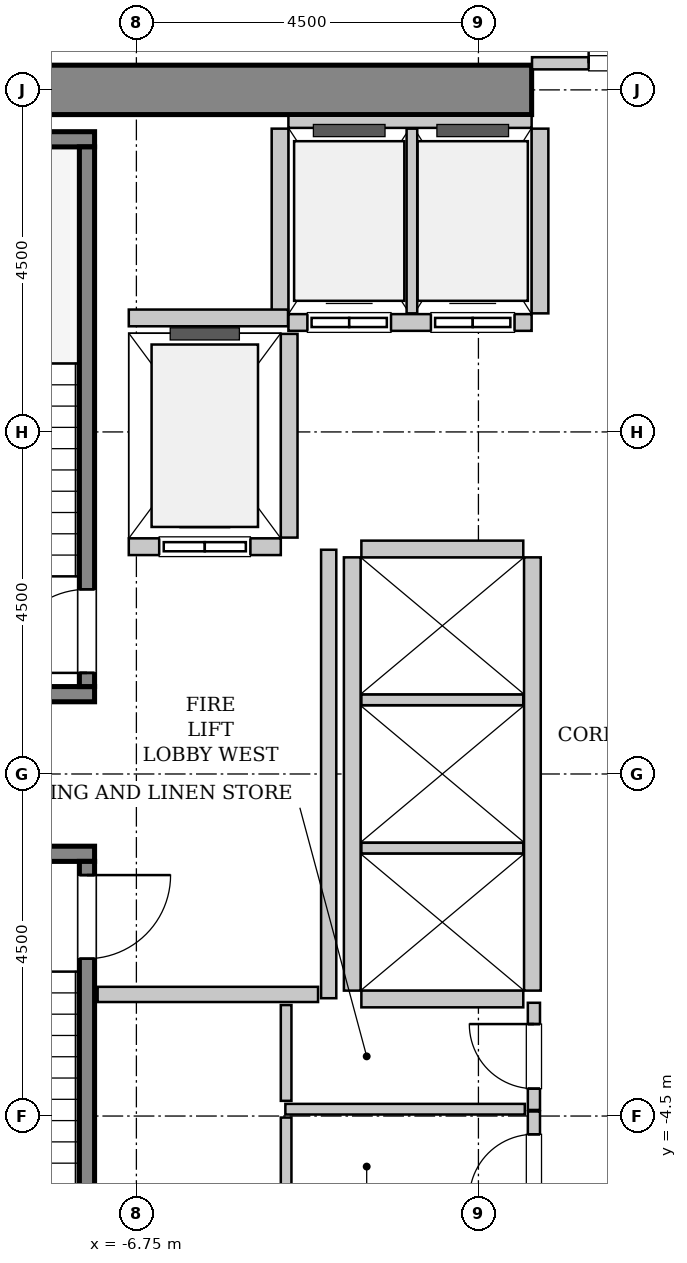
"""IFC4 building model, lengths in metres.
Left out: names, types, materials, properties, quantities, classifications, styles, units other than length and angle.
Written with IfcOpenShell. Run it as: python <this file> out.ifc"""

import sys

from ifc_helpers import new_model, si_unit, direction, frame, frame_2d, origin, place, context, subcontext, project, spatial, rectangle, extrude, source, transform, mapped, element, fill, save


model = new_model("IFC4")
c1 = context("Model", 3, precision=1e-05, world=origin(), true_north=direction((0.0, 1.0)))
c2 = subcontext(c1, "Body", "Model", "MODEL_VIEW")
j1 = project(units=[si_unit("LENGTHUNIT", "METRE"), si_unit("PLANEANGLEUNIT", "RADIAN")], contexts=[c1])
p1 = place(None, origin())
s1 = spatial("IfcSite", under=j1, at=p1, CompositionType="ELEMENT")
p2 = place(p1, origin())
s2 = spatial("IfcBuilding", under=s1, at=p2, CompositionType="ELEMENT")
p3 = place(p2, frame((0.0, 0.0, 59.6)))
s3 = spatial("IfcBuildingStorey", under=s2, at=p3, CompositionType="ELEMENT", Elevation=59.6)
m1 = source(origin(), c2, "Body", "SweptSolid", [
    extrude(rectangle(XDim=10.025, YDim=0.65, at=frame_2d((5.012, 0.0))), origin(), (0.0, 0.0, 1.0), 3.8),
])
p4 = place(p3, frame((-11.575, 9.0, 0.0), z_axis=(0.0, 0.0, 1.0), x_axis=(1.0, 0.0, 0.0)))
e1 = element("IfcWall", 1, at=p4, inside=s3, PredefinedType="SHEAR", context=c2, shape_type="MappedRepresentation", body=[
    mapped(m1, transform((0.0, 0.0, 0.0), x_axis=(1.0, 0.0, 0.0), y_axis=(0.0, 1.0, 0.0), z_axis=(0.0, 0.0, 1.0), scale=1.0)),
])
m2 = source(origin(), c2, "Body", "SweptSolid", [
    extrude(rectangle(XDim=3.4, YDim=0.2, at=frame_2d((1.7, 0.0))), origin(), (0.0, 0.0, 1.0), 3.8),
])
p5 = place(p3, frame((-7.3, 1.05, 0.0), z_axis=(0.0, 0.0, 1.0), x_axis=(-1.0, 0.0, 0.0)))
e2 = element("IfcWall", 2, at=p5, inside=s3, PredefinedType="SOLIDWALL", context=c2, shape_type="MappedRepresentation", body=[
    mapped(m2, transform((0.0, 0.0, 0.0), x_axis=(1.0, 0.0, 0.0), y_axis=(0.0, 1.0, 0.0), z_axis=(0.0, 0.0, 1.0), scale=1.0)),
])
m3 = source(origin(), c2, "Body", "SweptSolid", [
    extrude(rectangle(XDim=3.63, YDim=0.2, at=frame_2d((1.815, 0.0))), origin(), (0.0, 0.0, 1.0), 3.8),
])
p6 = place(p3, frame((-7.3, 8.35, 0.0), z_axis=(0.0, 0.0, 1.0), x_axis=(-1.0, 0.0, 0.0)))
e3 = element("IfcWall", 3, at=p6, inside=s3, PredefinedType="SOLIDWALL", context=c2, shape_type="MappedRepresentation", body=[
    mapped(m3, transform((0.0, 0.0, 0.0), x_axis=(1.0, 0.0, 0.0), y_axis=(0.0, 1.0, 0.0), z_axis=(0.0, 0.0, 1.0), scale=1.0)),
])
m4 = source(origin(), c2, "Body", "SweptSolid", [
    extrude(rectangle(XDim=7.1, YDim=0.2, at=frame_2d((3.55, 0.0))), origin(), (0.0, 0.0, 1.0), 3.8),
])
p7 = place(p3, frame((-7.4, 1.15, 0.0), z_axis=(0.0, 0.0, 1.0), x_axis=(0.0, 1.0, 0.0)))
e4 = element("IfcWall", 4, at=p7, inside=s3, PredefinedType="SOLIDWALL", context=c2, shape_type="MappedRepresentation", body=[
    mapped(m4, transform((0.0, 0.0, 0.0), x_axis=(1.0, 0.0, 0.0), y_axis=(0.0, 1.0, 0.0), z_axis=(0.0, 0.0, 1.0), scale=1.0)),
])
p8 = place(p7, frame((0.18, 0.0, 0.0)))
e5 = element("IfcOpeningElement", 5, at=p8, cuts=e4, PredefinedType="OPENING", context=c2, shape_type="SweptSolid", body=[
    extrude(rectangle(XDim=1.1, YDim=2.15, at=frame_2d((0.55, 1.075))), frame((0.0, 0.11, 0.0), z_axis=(0.0, -1.0, 0.0), x_axis=(1.0, 0.0, 0.0)), (0.0, 0.0, 1.0), 0.22),
])
p9 = place(p3, frame((-10.7, -1.05, 0.0), z_axis=(0.0, 0.0, 1.0), x_axis=(1.0, 0.0, 0.0)))
e6 = element("IfcWall", 6, at=p9, inside=s3, PredefinedType="SOLIDWALL", context=c2, shape_type="MappedRepresentation", body=[
    mapped(m2, transform((0.0, 0.0, 0.0), x_axis=(1.0, 0.0, 0.0), y_axis=(0.0, 1.0, 0.0), z_axis=(0.0, 0.0, 1.0), scale=1.0)),
])
p10 = place(p3, frame((-7.4, -1.15, 0.0), z_axis=(0.0, 0.0, 1.0), x_axis=(0.0, -1.0, 0.0)))
e7 = element("IfcWall", 7, at=p10, inside=s3, PredefinedType="SOLIDWALL", context=c2, shape_type="MappedRepresentation", body=[
    mapped(m4, transform((0.0, 0.0, 0.0), x_axis=(1.0, 0.0, 0.0), y_axis=(0.0, 1.0, 0.0), z_axis=(0.0, 0.0, 1.0), scale=1.0)),
])
p11 = place(p10, frame((0.18, 0.0, 0.0)))
e8 = element("IfcOpeningElement", 8, at=p11, cuts=e7, PredefinedType="OPENING", context=c2, shape_type="SweptSolid", body=[
    extrude(rectangle(XDim=1.1, YDim=2.15, at=frame_2d((0.55, 1.075))), frame((0.0, 0.11, 0.0), z_axis=(0.0, -1.0, 0.0), x_axis=(1.0, 0.0, 0.0)), (0.0, 0.0, 1.0), 0.22),
])
m5 = source(origin(), c2, "Body", "SweptSolid", [
    extrude(rectangle(XDim=2.0, YDim=0.22, at=frame_2d((1.0, 0.0))), origin(), (0.0, 0.0, 1.0), 3.535),
])
p12 = place(p3, frame((-6.85, 2.99, 0.0), z_axis=(0.0, 0.0, 1.0), x_axis=(1.0, 0.0, 0.0)))
e9 = element("IfcWall", 9, at=p12, inside=s3, PredefinedType="SOLIDWALL", context=c2, shape_type="MappedRepresentation", body=[
    mapped(m5, transform((0.0, 0.0, 0.0), x_axis=(1.0, 0.0, 0.0), y_axis=(0.0, 1.0, 0.0), z_axis=(0.0, 0.0, 1.0), scale=1.0)),
])
p13 = place(p12, frame((0.4, 0.0, 0.0)))
e10 = element("IfcOpeningElement", 10, at=p13, cuts=e9, PredefinedType="OPENING", context=c2, shape_type="SweptSolid", body=[
    extrude(rectangle(XDim=1.2, YDim=2.2, at=frame_2d((0.6, 1.1))), frame((0.0, 0.12, 0.0), z_axis=(0.0, -1.0, 0.0), x_axis=(1.0, 0.0, 0.0)), (0.0, 0.0, 1.0), 0.24),
])
m6 = source(origin(), c2, "Body", "SweptSolid", [
    extrude(rectangle(XDim=2.68, YDim=0.22, at=frame_2d((1.34, 0.0))), origin(), (0.0, 0.0, 1.0), 3.535),
])
p14 = place(p3, frame((-4.74, 3.11, 0.0), z_axis=(0.0, 0.0, 1.0), x_axis=(0.0, 1.0, 0.0)))
e11 = element("IfcWall", 11, at=p14, inside=s3, PredefinedType="SOLIDWALL", context=c2, shape_type="MappedRepresentation", body=[
    mapped(m6, transform((0.0, 0.0, 0.0), x_axis=(1.0, 0.0, 0.0), y_axis=(0.0, 1.0, 0.0), z_axis=(0.0, 0.0, 1.0), scale=1.0)),
])
m7 = source(origin(), c2, "Body", "SweptSolid", [
    extrude(rectangle(XDim=3.2, YDim=0.22, at=frame_2d((1.6, 0.0))), origin(), (0.0, 0.0, 1.0), 3.535),
])
p15 = place(p3, frame((-4.75, 5.94, 0.0), z_axis=(0.0, 0.0, 1.0), x_axis=(1.0, 0.0, 0.0)))
e12 = element("IfcWall", 12, at=p15, inside=s3, PredefinedType="SOLIDWALL", context=c2, shape_type="MappedRepresentation", body=[
    mapped(m7, transform((0.0, 0.0, 0.0), x_axis=(1.0, 0.0, 0.0), y_axis=(0.0, 1.0, 0.0), z_axis=(0.0, 0.0, 1.0), scale=1.0)),
])
p16 = place(p15, frame((0.25, 0.0, 0.0)))
e13 = element("IfcOpeningElement", 13, at=p16, cuts=e12, PredefinedType="OPENING", context=c2, shape_type="SweptSolid", body=[
    extrude(rectangle(XDim=1.1, YDim=2.2, at=frame_2d((0.55, 1.1))), frame((0.0, 0.12, 0.0), z_axis=(0.0, -1.0, 0.0), x_axis=(1.0, 0.0, 0.0)), (0.0, 0.0, 1.0), 0.24),
])
p17 = place(p15, frame((1.875, 0.0, 0.0)))
e14 = element("IfcOpeningElement", 14, at=p17, cuts=e12, PredefinedType="OPENING", context=c2, shape_type="SweptSolid", body=[
    extrude(rectangle(XDim=1.1, YDim=2.2, at=frame_2d((0.55, 1.1))), frame((0.0, 0.12, 0.0), z_axis=(0.0, -1.0, 0.0), x_axis=(1.0, 0.0, 0.0)), (0.0, 0.0, 1.0), 0.24),
])
m8 = source(origin(), c2, "Body", "SweptSolid", [
    extrude(rectangle(XDim=3.2, YDim=0.16, at=frame_2d((1.6, 0.0))), origin(), (0.0, 0.0, 1.0), 2.425),
])
p18 = place(p3, frame((-1.55, 8.58, 0.0), z_axis=(0.0, 0.0, 1.0), x_axis=(-1.0, 0.0, 0.0)))
e15 = element("IfcWall", 15, at=p18, inside=s3, PredefinedType="PARTITIONING", context=c2, shape_type="MappedRepresentation", body=[
    mapped(m8, transform((0.0, 0.0, 0.0), x_axis=(1.0, 0.0, 0.0), y_axis=(0.0, 1.0, 0.0), z_axis=(0.0, 0.0, 1.0), scale=1.0)),
])
m9 = source(origin(), c2, "Body", "SweptSolid", [
    extrude(rectangle(XDim=2.43, YDim=0.22, at=frame_2d((1.215, 0.0))), origin(), (0.0, 0.0, 1.0), 3.535),
])
p19 = place(p3, frame((-4.86, 8.49, 0.0), z_axis=(0.0, 0.0, 1.0), x_axis=(0.0, -1.0, 0.0)))
e16 = element("IfcWall", 16, at=p19, inside=s3, PredefinedType="SOLIDWALL", context=c2, shape_type="MappedRepresentation", body=[
    mapped(m9, transform((0.0, 0.0, 0.0), x_axis=(1.0, 0.0, 0.0), y_axis=(0.0, 1.0, 0.0), z_axis=(0.0, 0.0, 1.0), scale=1.0)),
])
m10 = source(origin(), c2, "Body", "SweptSolid", [
    extrude(rectangle(XDim=2.43, YDim=0.14, at=frame_2d((1.215, 0.0))), origin(), (0.0, 0.0, 1.0), 3.535),
])
p20 = place(p3, frame((-3.125, 6.06, 0.0), z_axis=(0.0, 0.0, 1.0), x_axis=(0.0, 1.0, 0.0)))
e17 = element("IfcWall", 17, at=p20, inside=s3, PredefinedType="PARTITIONING", context=c2, shape_type="MappedRepresentation", body=[
    mapped(m10, transform((0.0, 0.0, 0.0), x_axis=(1.0, 0.0, 0.0), y_axis=(0.0, 1.0, 0.0), z_axis=(0.0, 0.0, 1.0), scale=1.0)),
])
p21 = place(p3, frame((-1.44, 6.06, 0.0), z_axis=(0.0, 0.0, 1.0), x_axis=(0.0, 1.0, 0.0)))
e18 = element("IfcWall", 18, at=p21, inside=s3, PredefinedType="SOLIDWALL", context=c2, shape_type="MappedRepresentation", body=[
    mapped(m9, transform((0.0, 0.0, 0.0), x_axis=(1.0, 0.0, 0.0), y_axis=(0.0, 1.0, 0.0), z_axis=(0.0, 0.0, 1.0), scale=1.0)),
])
m11 = source(origin(), c2, "Body", "SweptSolid", [
    extrude(rectangle(XDim=5.7, YDim=0.22, at=frame_2d((2.85, 0.0))), origin(), (0.0, 0.0, 1.0), 3.535),
])
for number, where, z_axis, x_axis in (
    (19, (-1.54, -2.85, 0.0), (0.0, 0.0, 1.0), (0.0, 1.0, 0.0)),
    (20, (-3.91, 2.85, 0.0), (0.0, 0.0, 1.0), (0.0, -1.0, 0.0)),
):
    element("IfcWall", number, at=place(p3, frame(where, z_axis=z_axis, x_axis=x_axis)), inside=s3, PredefinedType="SOLIDWALL", context=c2, shape_type="MappedRepresentation", body=[
        mapped(m11, transform((0.0, 0.0, 0.0), x_axis=(1.0, 0.0, 0.0), y_axis=(0.0, 1.0, 0.0), z_axis=(0.0, 0.0, 1.0), scale=1.0)),
    ])
m12 = source(origin(), c2, "Body", "SweptSolid", [
    extrude(rectangle(XDim=2.13, YDim=0.22, at=frame_2d((1.065, 0.0))), origin(), (0.0, 0.0, 1.0), 3.535),
])
p22 = place(p3, frame((-3.79, -2.96, 0.0), z_axis=(0.0, 0.0, 1.0), x_axis=(1.0, 0.0, 0.0)))
e21 = element("IfcWall", 21, at=p22, inside=s3, PredefinedType="SOLIDWALL", context=c2, shape_type="MappedRepresentation", body=[
    mapped(m12, transform((0.0, 0.0, 0.0), x_axis=(1.0, 0.0, 0.0), y_axis=(0.0, 1.0, 0.0), z_axis=(0.0, 0.0, 1.0), scale=1.0)),
])
m13 = source(origin(), c2, "Body", "SweptSolid", [
    extrude(rectangle(XDim=2.13, YDim=0.14, at=frame_2d((1.065, 0.0))), origin(), (0.0, 0.0, 1.0), 3.535),
])
for number, where, z_axis, x_axis in (
    (22, (-3.79, -0.975, 0.0), (0.0, 0.0, 1.0), (1.0, 0.0, 0.0)),
    (23, (-3.79, 0.975, 0.0), (0.0, 0.0, 1.0), (1.0, 0.0, 0.0)),
):
    element("IfcWall", number, at=place(p3, frame(where, z_axis=z_axis, x_axis=x_axis)), inside=s3, PredefinedType="PARTITIONING", context=c2, shape_type="MappedRepresentation", body=[
        mapped(m13, transform((0.0, 0.0, 0.0), x_axis=(1.0, 0.0, 0.0), y_axis=(0.0, 1.0, 0.0), z_axis=(0.0, 0.0, 1.0), scale=1.0)),
    ])
p23 = place(p3, frame((-1.66, 2.96, 0.0), z_axis=(0.0, 0.0, 1.0), x_axis=(-1.0, 0.0, 0.0)))
e24 = element("IfcWall", 24, at=p23, inside=s3, PredefinedType="SOLIDWALL", context=c2, shape_type="MappedRepresentation", body=[
    mapped(m12, transform((0.0, 0.0, 0.0), x_axis=(1.0, 0.0, 0.0), y_axis=(0.0, 1.0, 0.0), z_axis=(0.0, 0.0, 1.0), scale=1.0)),
])
m14 = source(origin(), c2, "Body", "SweptSolid", [
    extrude(rectangle(XDim=2.095, YDim=0.22, at=frame_2d((1.048, 0.0))), origin(), (0.0, 0.0, 1.0), 3.535),
])
p24 = place(p3, frame((-6.85, 6.0, 0.0), z_axis=(0.0, 0.0, 1.0), x_axis=(1.0, 0.0, 0.0)))
e25 = element("IfcWall", 25, at=p24, inside=s3, PredefinedType="SOLIDWALL", context=c2, shape_type="MappedRepresentation", body=[
    mapped(m14, transform((0.0, 0.0, 0.0), x_axis=(1.0, 0.0, 0.0), y_axis=(0.0, 1.0, 0.0), z_axis=(0.0, 0.0, 1.0), scale=1.0)),
])
m15 = source(origin(), c2, "Body", "SweptSolid", [
    extrude(rectangle(XDim=5.9, YDim=0.2, at=frame_2d((2.95, 0.0))), origin(), (0.0, 0.0, 1.0), 3.535),
])
p25 = place(p3, frame((-4.22, -2.95, 0.0), z_axis=(0.0, 0.0, 1.0), x_axis=(0.0, 1.0, 0.0)))
e26 = element("IfcWall", 26, at=p25, inside=s3, PredefinedType="PARTITIONING", context=c2, shape_type="MappedRepresentation", body=[
    mapped(m15, transform((0.0, 0.0, 0.0), x_axis=(1.0, 0.0, 0.0), y_axis=(0.0, 1.0, 0.0), z_axis=(0.0, 0.0, 1.0), scale=1.0)),
])
m16 = source(origin(), c2, "Body", "SweptSolid", [
    extrude(rectangle(XDim=2.9, YDim=0.2, at=frame_2d((1.45, 0.0))), origin(), (0.0, 0.0, 1.0), 3.535),
])
p26 = place(p3, frame((-7.26, -2.9, 0.0), z_axis=(0.0, 0.0, 1.0), x_axis=(1.0, 0.0, 0.0)))
e27 = element("IfcWall", 27, at=p26, inside=s3, PredefinedType="PARTITIONING", context=c2, shape_type="MappedRepresentation", body=[
    mapped(m16, transform((0.0, 0.0, 0.0), x_axis=(1.0, 0.0, 0.0), y_axis=(0.0, 1.0, 0.0), z_axis=(0.0, 0.0, 1.0), scale=1.0)),
])
m17 = source(origin(), c2, "Body", "SweptSolid", [
    extrude(rectangle(XDim=3.09, YDim=0.16, at=frame_2d((1.545, 0.0))), origin(), (0.0, 0.0, 1.0), 2.425),
])
p27 = place(p3, frame((-1.545, 9.35, 0.0), z_axis=(0.0, 0.0, 1.0), x_axis=(1.0, 0.0, 0.0)))
e28 = element("IfcWall", 28, at=p27, inside=s3, PredefinedType="PARTITIONING", context=c2, shape_type="MappedRepresentation", body=[
    mapped(m17, transform((0.0, 0.0, 0.0), x_axis=(1.0, 0.0, 0.0), y_axis=(0.0, 1.0, 0.0), z_axis=(0.0, 0.0, 1.0), scale=1.0)),
])
p28 = place(p27, frame((0.745, 0.0, 0.0)))
e29 = element("IfcOpeningElement", 29, at=p28, cuts=e28, PredefinedType="OPENING", context=c2, shape_type="SweptSolid", body=[
    extrude(rectangle(XDim=1.6, YDim=2.3, at=frame_2d((0.8, 1.15))), frame((0.0, 0.09, 0.0), z_axis=(0.0, -1.0, 0.0), x_axis=(1.0, 0.0, 0.0)), (0.0, 0.0, 1.0), 0.18),
])
m18 = source(origin(), c2, "Body", "SweptSolid", [
    extrude(rectangle(XDim=1.41, YDim=0.16, at=frame_2d((0.705, 0.0))), origin(), (0.0, 0.0, 1.0), 3.535),
])
p29 = place(p3, frame((-1.52, -4.42, 0.0), z_axis=(0.0, 0.0, 1.0), x_axis=(0.0, 1.0, 0.0)))
e30 = element("IfcWall", 30, at=p29, inside=s3, PredefinedType="PARTITIONING", context=c2, shape_type="MappedRepresentation", body=[
    mapped(m18, transform((0.0, 0.0, 0.0), x_axis=(1.0, 0.0, 0.0), y_axis=(0.0, 1.0, 0.0), z_axis=(0.0, 0.0, 1.0), scale=1.0)),
])
p30 = place(p29, frame((0.28, 0.0, 0.0)))
e31 = element("IfcOpeningElement", 31, at=p30, cuts=e30, PredefinedType="OPENING", context=c2, shape_type="SweptSolid", body=[
    extrude(rectangle(XDim=0.85, YDim=2.1, at=frame_2d((0.425, 1.05))), frame((0.0, 0.09, 0.0), z_axis=(0.0, -1.0, 0.0), x_axis=(1.0, 0.0, 0.0)), (0.0, 0.0, 1.0), 0.18),
])
m19 = source(origin(), c2, "Body", "SweptSolid", [
    extrude(rectangle(XDim=3.15, YDim=0.14, at=frame_2d((1.575, 0.0))), origin(), (0.0, 0.0, 1.0), 3.535),
])
p31 = place(p3, frame((-4.79, -4.41, 0.0), z_axis=(0.0, 0.0, 1.0), x_axis=(1.0, 0.0, 0.0)))
e32 = element("IfcWall", 32, at=p31, inside=s3, PredefinedType="PARTITIONING", context=c2, shape_type="MappedRepresentation", body=[
    mapped(m19, transform((0.0, 0.0, 0.0), x_axis=(1.0, 0.0, 0.0), y_axis=(0.0, 1.0, 0.0), z_axis=(0.0, 0.0, 1.0), scale=1.0)),
])
m20 = source(origin(), c2, "Body", "SweptSolid", [
    extrude(rectangle(XDim=1.26, YDim=0.14, at=frame_2d((0.63, 0.0))), origin(), (0.0, 0.0, 1.0), 3.535),
])
p32 = place(p3, frame((-4.78, -4.3, 0.0), z_axis=(0.0, 0.0, 1.0), x_axis=(0.0, 1.0, 0.0)))
e33 = element("IfcWall", 33, at=p32, inside=s3, PredefinedType="PARTITIONING", context=c2, shape_type="MappedRepresentation", body=[
    mapped(m20, transform((0.0, 0.0, 0.0), x_axis=(1.0, 0.0, 0.0), y_axis=(0.0, 1.0, 0.0), z_axis=(0.0, 0.0, 1.0), scale=1.0)),
])
m21 = source(origin(), c2, "Body", "SweptSolid", [
    extrude(rectangle(XDim=1.45, YDim=0.16, at=frame_2d((0.725, 0.0))), origin(), (0.0, 0.0, 1.0), 3.535),
])
p33 = place(p3, frame((-1.52, -5.89, 0.0), z_axis=(0.0, 0.0, 1.0), x_axis=(0.0, 1.0, 0.0)))
e34 = element("IfcWall", 34, at=p33, inside=s3, PredefinedType="PARTITIONING", context=c2, shape_type="MappedRepresentation", body=[
    mapped(m21, transform((0.0, 0.0, 0.0), x_axis=(1.0, 0.0, 0.0), y_axis=(0.0, 1.0, 0.0), z_axis=(0.0, 0.0, 1.0), scale=1.0)),
])
p34 = place(p33, frame((0.3, 0.0, 0.0)))
e35 = element("IfcOpeningElement", 35, at=p34, cuts=e34, PredefinedType="OPENING", context=c2, shape_type="SweptSolid", body=[
    extrude(rectangle(XDim=0.85, YDim=2.1, at=frame_2d((0.425, 1.05))), frame((0.0, 0.09, 0.0), z_axis=(0.0, -1.0, 0.0), x_axis=(1.0, 0.0, 0.0)), (0.0, 0.0, 1.0), 0.18),
])
m22 = source(origin(), c2, "Body", "SweptSolid", [
    extrude(rectangle(XDim=1.37, YDim=0.14, at=frame_2d((0.685, 0.0))), origin(), (0.0, 0.0, 1.0), 3.535),
])
p35 = place(p3, frame((-4.78, -5.89, 0.0), z_axis=(0.0, 0.0, 1.0), x_axis=(0.0, 1.0, 0.0)))
e36 = element("IfcWall", 36, at=p35, inside=s3, PredefinedType="PARTITIONING", context=c2, shape_type="MappedRepresentation", body=[
    mapped(m22, transform((0.0, 0.0, 0.0), x_axis=(1.0, 0.0, 0.0), y_axis=(0.0, 1.0, 0.0), z_axis=(0.0, 0.0, 1.0), scale=1.0)),
])
m23 = source(origin(), c2, "Body", "SweptSolid", [
    extrude(rectangle(XDim=1.1, YDim=2.15, at=frame_2d((0.55, 1.075))), frame((0.0, 0.025, 0.0), z_axis=(0.0, -1.0, 0.0), x_axis=(1.0, 0.0, 0.0)), (0.0, 0.0, 1.0), 0.05),
])
p36 = place(p8, origin())
e37 = element("IfcDoor", 37, at=p36, inside=s3, OperationType="SINGLE_SWING_LEFT", PredefinedType="DOOR", context=c2, shape_type="MappedRepresentation", body=[
    mapped(m23, transform((0.0, 0.0, 0.0), x_axis=(1.0, 0.0, 0.0), y_axis=(0.0, 1.0, 0.0), z_axis=(0.0, 0.0, 1.0), scale=1.0)),
])
fill(e5, e37)
p37 = place(p11, origin())
e38 = element("IfcDoor", 38, at=p37, inside=s3, OperationType="SINGLE_SWING_LEFT", PredefinedType="DOOR", context=c2, shape_type="MappedRepresentation", body=[
    mapped(m23, transform((0.0, 0.0, 0.0), x_axis=(1.0, 0.0, 0.0), y_axis=(0.0, 1.0, 0.0), z_axis=(0.0, 0.0, 1.0), scale=1.0)),
])
fill(e8, e38)
m24 = source(origin(), c2, "Body", "SweptSolid", [
    extrude(rectangle(XDim=1.2, YDim=2.2, at=frame_2d((0.6, 1.1))), frame((0.0, 0.025, 0.0), z_axis=(0.0, -1.0, 0.0), x_axis=(1.0, 0.0, 0.0)), (0.0, 0.0, 1.0), 0.05),
])
p38 = place(p13, origin())
e39 = element("IfcDoor", 39, at=p38, inside=s3, OperationType="SLIDING_TO_LEFT", PredefinedType="DOOR", context=c2, shape_type="MappedRepresentation", body=[
    mapped(m24, transform((0.0, 0.0, 0.0), x_axis=(1.0, 0.0, 0.0), y_axis=(0.0, 1.0, 0.0), z_axis=(0.0, 0.0, 1.0), scale=1.0)),
])
fill(e10, e39)
m25 = source(origin(), c2, "Body", "SweptSolid", [
    extrude(rectangle(XDim=1.1, YDim=2.2, at=frame_2d((0.55, 1.1))), frame((0.0, 0.025, 0.0), z_axis=(0.0, -1.0, 0.0), x_axis=(1.0, 0.0, 0.0)), (0.0, 0.0, 1.0), 0.05),
])
p39 = place(p16, origin())
e40 = element("IfcDoor", 40, at=p39, inside=s3, OperationType="DOUBLE_DOOR_SLIDING", PredefinedType="DOOR", context=c2, shape_type="MappedRepresentation", body=[
    mapped(m25, transform((0.0, 0.0, 0.0), x_axis=(1.0, 0.0, 0.0), y_axis=(0.0, 1.0, 0.0), z_axis=(0.0, 0.0, 1.0), scale=1.0)),
])
fill(e13, e40)
p40 = place(p17, origin())
e41 = element("IfcDoor", 41, at=p40, inside=s3, OperationType="DOUBLE_DOOR_SLIDING", PredefinedType="DOOR", context=c2, shape_type="MappedRepresentation", body=[
    mapped(m25, transform((0.0, 0.0, 0.0), x_axis=(1.0, 0.0, 0.0), y_axis=(0.0, 1.0, 0.0), z_axis=(0.0, 0.0, 1.0), scale=1.0)),
])
fill(e14, e41)
m26 = source(origin(), c2, "Body", "SweptSolid", [
    extrude(rectangle(XDim=1.6, YDim=2.3, at=frame_2d((0.8, 1.15))), frame((0.0, 0.025, 0.0), z_axis=(0.0, -1.0, 0.0), x_axis=(1.0, 0.0, 0.0)), (0.0, 0.0, 1.0), 0.05),
])
p41 = place(p28, origin())
e42 = element("IfcDoor", 42, at=p41, inside=s3, OperationType="DOUBLE_DOOR_SINGLE_SWING", PredefinedType="DOOR", context=c2, shape_type="MappedRepresentation", body=[
    mapped(m26, transform((0.0, 0.0, 0.0), x_axis=(1.0, 0.0, 0.0), y_axis=(0.0, 1.0, 0.0), z_axis=(0.0, 0.0, 1.0), scale=1.0)),
])
fill(e29, e42)
m27 = source(origin(), c2, "Body", "SweptSolid", [
    extrude(rectangle(XDim=0.85, YDim=2.1, at=frame_2d((0.425, 1.05))), frame((0.0, 0.025, 0.0), z_axis=(0.0, -1.0, 0.0), x_axis=(1.0, 0.0, 0.0)), (0.0, 0.0, 1.0), 0.05),
])
p42 = place(p30, origin())
e43 = element("IfcDoor", 43, at=p42, inside=s3, OperationType="SINGLE_SWING_RIGHT", PredefinedType="DOOR", context=c2, shape_type="MappedRepresentation", body=[
    mapped(m27, transform((0.0, 0.0, 0.0), x_axis=(1.0, 0.0, 0.0), y_axis=(0.0, 1.0, 0.0), z_axis=(0.0, 0.0, 1.0), scale=1.0)),
])
fill(e31, e43)
p43 = place(p34, origin())
e44 = element("IfcDoor", 44, at=p43, inside=s3, OperationType="SINGLE_SWING_LEFT", PredefinedType="DOOR", context=c2, shape_type="MappedRepresentation", body=[
    mapped(m27, transform((0.0, 0.0, 0.0), x_axis=(1.0, 0.0, 0.0), y_axis=(0.0, 1.0, 0.0), z_axis=(0.0, 0.0, 1.0), scale=1.0)),
])
fill(e35, e44)
save(model, sys.argv[1])
